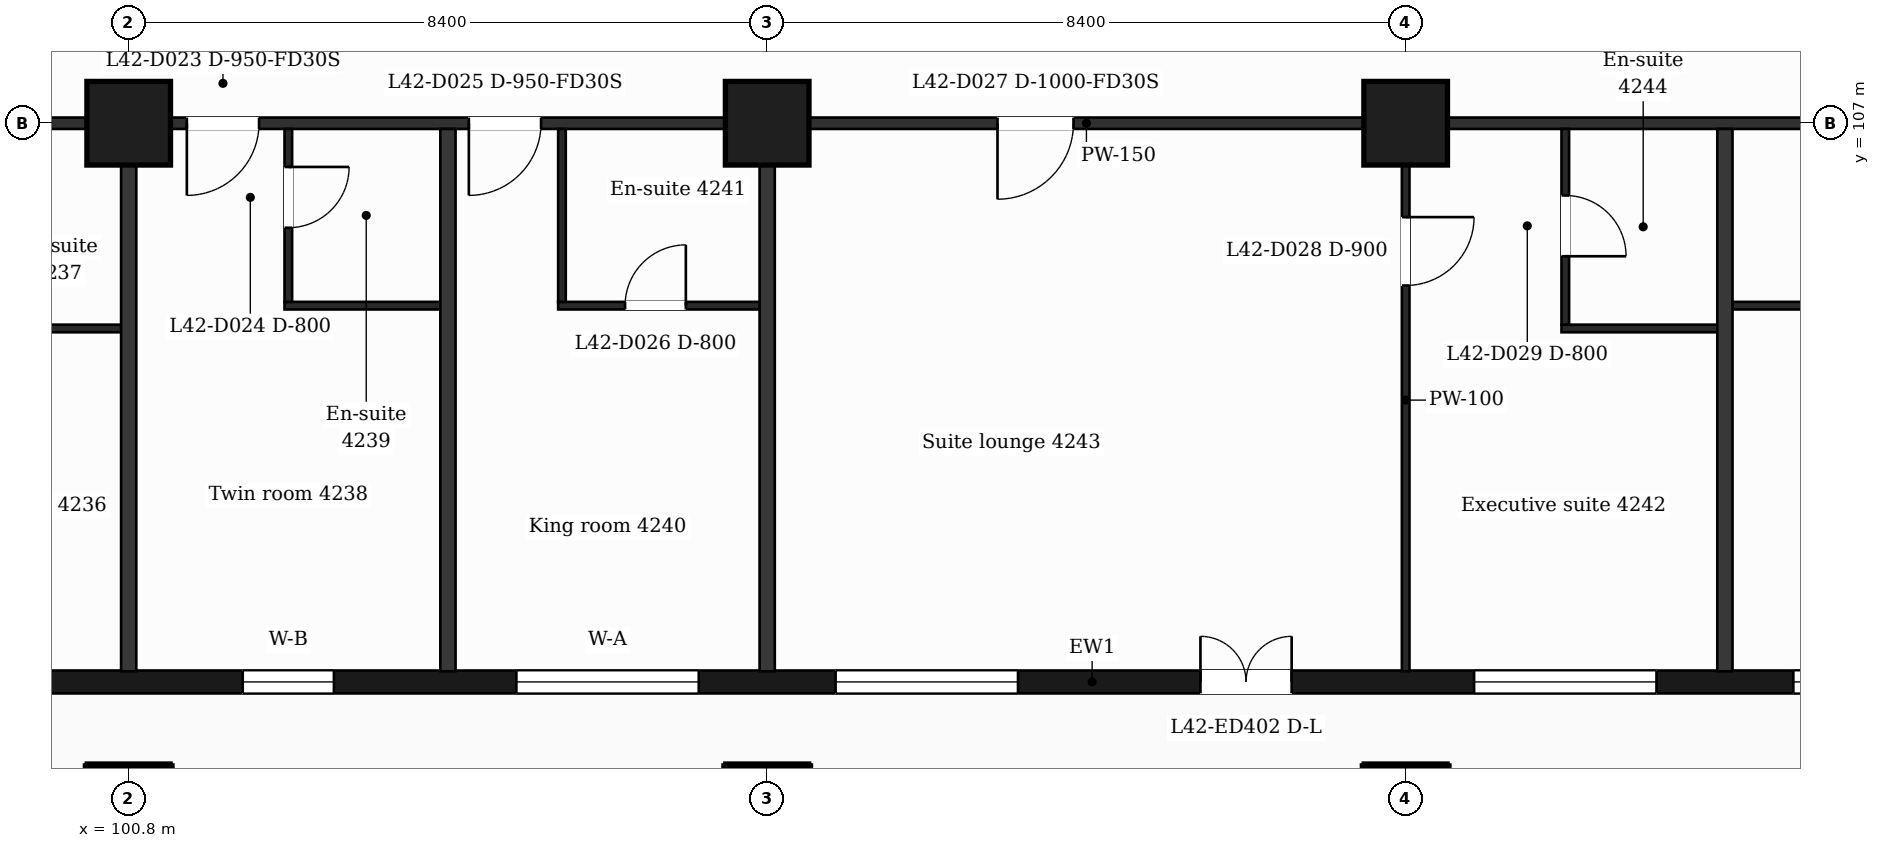
"""IFC4 building model, lengths in metres.
Left out: names, types, materials, properties, quantities, classifications, styles, units other than length and angle.
Written with IfcOpenShell. Run it as: python <this file> out.ifc"""

import sys

from ifc_helpers import new_model, si_unit, direction, frame, frame_2d, origin, origin_2d, place, context, subcontext, project, spatial, rectangle, extrude, element, fill, save


model = new_model("IFC4")
c1 = context("Model", 3, precision=1e-05, world=origin(), true_north=direction((0.0, 1.0)))
c2 = subcontext(c1, "Body", "Model", "MODEL_VIEW")
j1 = project(units=[si_unit("LENGTHUNIT", "METRE"), si_unit("PLANEANGLEUNIT", "RADIAN")], contexts=[c1])
p1 = place(None, origin())
s1 = spatial("IfcSite", under=j1, at=p1, CompositionType="ELEMENT")
p2 = place(p1, origin())
s2 = spatial("IfcBuilding", under=s1, at=p2, CompositionType="ELEMENT")
p3 = place(p2, frame((0.0, 0.0, 177.4)))
s3 = spatial("IfcBuildingStorey", under=s2, at=p3, CompositionType="ELEMENT", Elevation=177.4)
for number, where, z_axis, x_axis in (
    (1, (100.8, 98.0, 0.0), (0.0, 0.0, 1.0), (1.0, 0.0, 0.0)),
    (2, (109.2, 98.0, 0.0), (0.0, 0.0, 1.0), (1.0, 0.0, 0.0)),
    (3, (117.6, 98.0, 0.0), (0.0, 0.0, 1.0), (1.0, 0.0, 0.0)),
    (4, (100.8, 107.0, 0.0), (0.0, 0.0, 1.0), (1.0, 0.0, 0.0)),
    (5, (109.2, 107.0, 0.0), (0.0, 0.0, 1.0), (1.0, 0.0, 0.0)),
    (6, (117.6, 107.0, 0.0), (0.0, 0.0, 1.0), (1.0, 0.0, 0.0)),
):
    element("IfcColumn", number, at=place(p3, frame(where, z_axis=z_axis, x_axis=x_axis)), inside=s3, PredefinedType="COLUMN", context=c2, shape_type="SweptSolid", body=[
        extrude(rectangle(XDim=1.1, YDim=1.1, at=origin_2d()), origin(), (0.0, 0.0, 1.0), 3.7),
    ])
p4 = place(p3, frame((89.85, 99.65, 0.0), z_axis=(0.0, 0.0, 1.0), x_axis=(1.0, 0.0, 0.0)))
e7 = element("IfcWall", 7, at=p4, inside=s3, PredefinedType="SOLIDWALL", context=c2, shape_type="SweptSolid", body=[
    extrude(rectangle(XDim=47.25, YDim=0.3, at=frame_2d((23.625, 0.0))), origin(), (0.0, 0.0, 1.0), 3.38),
])
p5 = place(p4, frame((0.725, 0.0, 0.9)))
e8 = element("IfcOpeningElement", 8, at=p5, cuts=e7, PredefinedType="OPENING", context=c2, shape_type="SweptSolid", body=[
    extrude(rectangle(XDim=1.2, YDim=2.1, at=frame_2d((0.6, 1.05))), frame((0.0, 0.16, 0.0), z_axis=(0.0, -1.0, 0.0), x_axis=(1.0, 0.0, 0.0)), (0.0, 0.0, 1.0), 0.32),
])
p6 = place(p4, frame((3.45, 0.0, 0.9)))
e9 = element("IfcOpeningElement", 9, at=p6, cuts=e7, PredefinedType="OPENING", context=c2, shape_type="SweptSolid", body=[
    extrude(rectangle(XDim=2.4, YDim=2.1, at=frame_2d((1.2, 1.05))), frame((0.0, 0.16, 0.0), z_axis=(0.0, -1.0, 0.0), x_axis=(1.0, 0.0, 0.0)), (0.0, 0.0, 1.0), 0.32),
])
p7 = place(p4, frame((8.25, 0.0, 0.9)))
e10 = element("IfcOpeningElement", 10, at=p7, cuts=e7, PredefinedType="OPENING", context=c2, shape_type="SweptSolid", body=[
    extrude(rectangle(XDim=1.2, YDim=2.1, at=frame_2d((0.6, 1.05))), frame((0.0, 0.16, 0.0), z_axis=(0.0, -1.0, 0.0), x_axis=(1.0, 0.0, 0.0)), (0.0, 0.0, 1.0), 0.32),
])
p8 = place(p4, frame((12.45, 0.0, 0.9)))
e11 = element("IfcOpeningElement", 11, at=p8, cuts=e7, PredefinedType="OPENING", context=c2, shape_type="SweptSolid", body=[
    extrude(rectangle(XDim=1.2, YDim=2.1, at=frame_2d((0.6, 1.05))), frame((0.0, 0.16, 0.0), z_axis=(0.0, -1.0, 0.0), x_axis=(1.0, 0.0, 0.0)), (0.0, 0.0, 1.0), 0.32),
])
p9 = place(p4, frame((16.05, 0.0, 0.9)))
e12 = element("IfcOpeningElement", 12, at=p9, cuts=e7, PredefinedType="OPENING", context=c2, shape_type="SweptSolid", body=[
    extrude(rectangle(XDim=2.4, YDim=2.1, at=frame_2d((1.2, 1.05))), frame((0.0, 0.16, 0.0), z_axis=(0.0, -1.0, 0.0), x_axis=(1.0, 0.0, 0.0)), (0.0, 0.0, 1.0), 0.32),
])
p10 = place(p4, frame((20.25, 0.0, 0.9)))
e13 = element("IfcOpeningElement", 13, at=p10, cuts=e7, PredefinedType="OPENING", context=c2, shape_type="SweptSolid", body=[
    extrude(rectangle(XDim=2.4, YDim=2.1, at=frame_2d((1.2, 1.05))), frame((0.0, 0.16, 0.0), z_axis=(0.0, -1.0, 0.0), x_axis=(1.0, 0.0, 0.0)), (0.0, 0.0, 1.0), 0.32),
])
p11 = place(p4, frame((25.05, 0.0, 0.0)))
e14 = element("IfcOpeningElement", 14, at=p11, cuts=e7, PredefinedType="OPENING", context=c2, shape_type="SweptSolid", body=[
    extrude(rectangle(XDim=1.2, YDim=2.4, at=frame_2d((0.6, 1.2))), frame((0.0, 0.16, 0.0), z_axis=(0.0, -1.0, 0.0), x_axis=(1.0, 0.0, 0.0)), (0.0, 0.0, 1.0), 0.32),
])
p12 = place(p4, frame((28.65, 0.0, 0.9)))
e15 = element("IfcOpeningElement", 15, at=p12, cuts=e7, PredefinedType="OPENING", context=c2, shape_type="SweptSolid", body=[
    extrude(rectangle(XDim=2.4, YDim=2.1, at=frame_2d((1.2, 1.05))), frame((0.0, 0.16, 0.0), z_axis=(0.0, -1.0, 0.0), x_axis=(1.0, 0.0, 0.0)), (0.0, 0.0, 1.0), 0.32),
])
p13 = place(p4, frame((32.85, 0.0, 0.9)))
e16 = element("IfcOpeningElement", 16, at=p13, cuts=e7, PredefinedType="OPENING", context=c2, shape_type="SweptSolid", body=[
    extrude(rectangle(XDim=2.4, YDim=2.1, at=frame_2d((1.2, 1.05))), frame((0.0, 0.16, 0.0), z_axis=(0.0, -1.0, 0.0), x_axis=(1.0, 0.0, 0.0)), (0.0, 0.0, 1.0), 0.32),
])
p14 = place(p4, frame((37.65, 0.0, 0.9)))
e17 = element("IfcOpeningElement", 17, at=p14, cuts=e7, PredefinedType="OPENING", context=c2, shape_type="SweptSolid", body=[
    extrude(rectangle(XDim=1.2, YDim=2.1, at=frame_2d((0.6, 1.05))), frame((0.0, 0.16, 0.0), z_axis=(0.0, -1.0, 0.0), x_axis=(1.0, 0.0, 0.0)), (0.0, 0.0, 1.0), 0.32),
])
p15 = place(p4, frame((41.85, 0.0, 0.9)))
e18 = element("IfcOpeningElement", 18, at=p15, cuts=e7, PredefinedType="OPENING", context=c2, shape_type="SweptSolid", body=[
    extrude(rectangle(XDim=1.2, YDim=2.1, at=frame_2d((0.6, 1.05))), frame((0.0, 0.16, 0.0), z_axis=(0.0, -1.0, 0.0), x_axis=(1.0, 0.0, 0.0)), (0.0, 0.0, 1.0), 0.32),
])
p16 = place(p4, frame((45.25, 0.0, 0.9)))
e19 = element("IfcOpeningElement", 19, at=p16, cuts=e7, PredefinedType="OPENING", context=c2, shape_type="SweptSolid", body=[
    extrude(rectangle(XDim=1.2, YDim=2.1, at=frame_2d((0.6, 1.05))), frame((0.0, 0.16, 0.0), z_axis=(0.0, -1.0, 0.0), x_axis=(1.0, 0.0, 0.0)), (0.0, 0.0, 1.0), 0.32),
])
p17 = place(p3, frame((98.05, 104.3, 0.0), z_axis=(0.0, 0.0, 1.0), x_axis=(1.0, 0.0, 0.0)))
e20 = element("IfcWall", 20, at=p17, inside=s3, PredefinedType="PARTITIONING", context=c2, shape_type="SweptSolid", body=[
    extrude(rectangle(XDim=2.75, YDim=0.1, at=frame_2d((1.375, 0.0))), origin(), (0.0, 0.0, 1.0), 3.38),
])
p18 = place(p3, frame((119.65, 104.3, 0.0), z_axis=(0.0, 0.0, 1.0), x_axis=(1.0, 0.0, 0.0)))
e21 = element("IfcWall", 21, at=p18, inside=s3, PredefinedType="PARTITIONING", context=c2, shape_type="SweptSolid", body=[
    extrude(rectangle(XDim=2.15, YDim=0.1, at=frame_2d((1.075, 0.0))), origin(), (0.0, 0.0, 1.0), 3.38),
])
p19 = place(p3, frame((102.85, 104.6, 0.0), z_axis=(0.0, 0.0, 1.0), x_axis=(1.0, 0.0, 0.0)))
e22 = element("IfcWall", 22, at=p19, inside=s3, PredefinedType="PARTITIONING", context=c2, shape_type="SweptSolid", body=[
    extrude(rectangle(XDim=2.15, YDim=0.1, at=frame_2d((1.075, 0.0))), origin(), (0.0, 0.0, 1.0), 3.38),
])
p20 = place(p3, frame((106.45, 104.6, 0.0), z_axis=(0.0, 0.0, 1.0), x_axis=(1.0, 0.0, 0.0)))
e23 = element("IfcWall", 23, at=p20, inside=s3, PredefinedType="PARTITIONING", context=c2, shape_type="SweptSolid", body=[
    extrude(rectangle(XDim=2.75, YDim=0.1, at=frame_2d((1.375, 0.0))), origin(), (0.0, 0.0, 1.0), 3.38),
])
p21 = place(p20, frame((0.88, 0.0, 0.0)))
e24 = element("IfcOpeningElement", 24, at=p21, cuts=e23, PredefinedType="OPENING", context=c2, shape_type="SweptSolid", body=[
    extrude(rectangle(XDim=0.8, YDim=2.1, at=frame_2d((0.4, 1.05))), frame((0.0, 0.06, 0.0), z_axis=(0.0, -1.0, 0.0), x_axis=(1.0, 0.0, 0.0)), (0.0, 0.0, 1.0), 0.12),
])
p22 = place(p3, frame((121.8, 104.6, 0.0), z_axis=(0.0, 0.0, 1.0), x_axis=(1.0, 0.0, 0.0)))
e25 = element("IfcWall", 25, at=p22, inside=s3, PredefinedType="PARTITIONING", context=c2, shape_type="SweptSolid", body=[
    extrude(rectangle(XDim=2.15, YDim=0.1, at=frame_2d((1.075, 0.0))), origin(), (0.0, 0.0, 1.0), 3.38),
])
p23 = place(p3, frame((87.018, 107.0, 0.0), z_axis=(0.0, 0.0, 1.0), x_axis=(1.0, 0.0, 0.0)))
e26 = element("IfcWall", 26, at=p23, inside=s3, PredefinedType="PARTITIONING", context=c2, shape_type="SweptSolid", body=[
    extrude(rectangle(XDim=52.765, YDim=0.15, at=frame_2d((26.382, 0.0))), origin(), (0.0, 0.0, 1.0), 3.38),
])
p24 = place(p23, frame((1.276, 0.0, 0.0)))
e27 = element("IfcOpeningElement", 27, at=p24, cuts=e26, PredefinedType="OPENING", context=c2, shape_type="SweptSolid", body=[
    extrude(rectangle(XDim=0.95, YDim=2.1, at=frame_2d((0.475, 1.05))), frame((0.0, 0.085, 0.0), z_axis=(0.0, -1.0, 0.0), x_axis=(1.0, 0.0, 0.0)), (0.0, 0.0, 1.0), 0.17),
])
p25 = place(p23, frame((8.357, 0.0, 0.0)))
e28 = element("IfcOpeningElement", 28, at=p25, cuts=e26, PredefinedType="OPENING", context=c2, shape_type="SweptSolid", body=[
    extrude(rectangle(XDim=0.95, YDim=2.1, at=frame_2d((0.475, 1.05))), frame((0.0, 0.085, 0.0), z_axis=(0.0, -1.0, 0.0), x_axis=(1.0, 0.0, 0.0)), (0.0, 0.0, 1.0), 0.17),
])
p26 = place(p23, frame((9.832, 0.0, 0.0)))
e29 = element("IfcOpeningElement", 29, at=p26, cuts=e26, PredefinedType="OPENING", context=c2, shape_type="SweptSolid", body=[
    extrude(rectangle(XDim=1.0, YDim=2.1, at=frame_2d((0.5, 1.05))), frame((0.0, 0.085, 0.0), z_axis=(0.0, -1.0, 0.0), x_axis=(1.0, 0.0, 0.0)), (0.0, 0.0, 1.0), 0.17),
])
p27 = place(p23, frame((14.547, 0.0, 0.0)))
e30 = element("IfcOpeningElement", 30, at=p27, cuts=e26, PredefinedType="OPENING", context=c2, shape_type="SweptSolid", body=[
    extrude(rectangle(XDim=0.95, YDim=2.1, at=frame_2d((0.475, 1.05))), frame((0.0, 0.085, 0.0), z_axis=(0.0, -1.0, 0.0), x_axis=(1.0, 0.0, 0.0)), (0.0, 0.0, 1.0), 0.17),
])
p28 = place(p23, frame((18.257, 0.0, 0.0)))
e31 = element("IfcOpeningElement", 31, at=p28, cuts=e26, PredefinedType="OPENING", context=c2, shape_type="SweptSolid", body=[
    extrude(rectangle(XDim=0.95, YDim=2.1, at=frame_2d((0.475, 1.05))), frame((0.0, 0.085, 0.0), z_axis=(0.0, -1.0, 0.0), x_axis=(1.0, 0.0, 0.0)), (0.0, 0.0, 1.0), 0.17),
])
p29 = place(p23, frame((25.212, 0.0, 0.0)))
e32 = element("IfcOpeningElement", 32, at=p29, cuts=e26, PredefinedType="OPENING", context=c2, shape_type="SweptSolid", body=[
    extrude(rectangle(XDim=1.0, YDim=2.1, at=frame_2d((0.5, 1.05))), frame((0.0, 0.085, 0.0), z_axis=(0.0, -1.0, 0.0), x_axis=(1.0, 0.0, 0.0)), (0.0, 0.0, 1.0), 0.17),
])
p30 = place(p23, frame((37.267, 0.0, 0.0)))
e33 = element("IfcOpeningElement", 33, at=p30, cuts=e26, PredefinedType="OPENING", context=c2, shape_type="SweptSolid", body=[
    extrude(rectangle(XDim=0.95, YDim=2.1, at=frame_2d((0.475, 1.05))), frame((0.0, 0.085, 0.0), z_axis=(0.0, -1.0, 0.0), x_axis=(1.0, 0.0, 0.0)), (0.0, 0.0, 1.0), 0.17),
])
p31 = place(p23, frame((41.957, 0.0, 0.0)))
e34 = element("IfcOpeningElement", 34, at=p31, cuts=e26, PredefinedType="OPENING", context=c2, shape_type="SweptSolid", body=[
    extrude(rectangle(XDim=0.95, YDim=2.1, at=frame_2d((0.475, 1.05))), frame((0.0, 0.085, 0.0), z_axis=(0.0, -1.0, 0.0), x_axis=(1.0, 0.0, 0.0)), (0.0, 0.0, 1.0), 0.17),
])
p32 = place(p23, frame((45.632, 0.0, 0.0)))
e35 = element("IfcOpeningElement", 35, at=p32, cuts=e26, PredefinedType="OPENING", context=c2, shape_type="SweptSolid", body=[
    extrude(rectangle(XDim=0.95, YDim=2.1, at=frame_2d((0.475, 1.05))), frame((0.0, 0.085, 0.0), z_axis=(0.0, -1.0, 0.0), x_axis=(1.0, 0.0, 0.0)), (0.0, 0.0, 1.0), 0.17),
])
p33 = place(p23, frame((48.767, 0.0, 0.0)))
e36 = element("IfcOpeningElement", 36, at=p33, cuts=e26, PredefinedType="OPENING", context=c2, shape_type="SweptSolid", body=[
    extrude(rectangle(XDim=0.95, YDim=2.1, at=frame_2d((0.475, 1.05))), frame((0.0, 0.085, 0.0), z_axis=(0.0, -1.0, 0.0), x_axis=(1.0, 0.0, 0.0)), (0.0, 0.0, 1.0), 0.17),
])
p34 = place(p3, frame((100.8, 99.79, 0.0), z_axis=(0.0, 0.0, 1.0), x_axis=(0.0, 1.0, 0.0)))
e37 = element("IfcWall", 37, at=p34, inside=s3, PredefinedType="PARTITIONING", context=c2, shape_type="SweptSolid", body=[
    extrude(rectangle(XDim=7.135, YDim=0.2, at=frame_2d((3.567, 0.0))), origin(), (0.0, 0.0, 1.0), 3.38),
])
p35 = place(p3, frame((102.9, 104.65, 0.0), z_axis=(0.0, 0.0, 1.0), x_axis=(0.0, 1.0, 0.0)))
e38 = element("IfcWall", 38, at=p35, inside=s3, PredefinedType="PARTITIONING", context=c2, shape_type="SweptSolid", body=[
    extrude(rectangle(XDim=2.275, YDim=0.1, at=frame_2d((1.138, 0.0))), origin(), (0.0, 0.0, 1.0), 3.38),
])
p36 = place(p35, frame((0.975, 0.0, 0.0)))
e39 = element("IfcOpeningElement", 39, at=p36, cuts=e38, PredefinedType="OPENING", context=c2, shape_type="SweptSolid", body=[
    extrude(rectangle(XDim=0.8, YDim=2.1, at=frame_2d((0.4, 1.05))), frame((0.0, 0.06, 0.0), z_axis=(0.0, -1.0, 0.0), x_axis=(1.0, 0.0, 0.0)), (0.0, 0.0, 1.0), 0.12),
])
p37 = place(p3, frame((105.0, 99.79, 0.0), z_axis=(0.0, 0.0, 1.0), x_axis=(0.0, 1.0, 0.0)))
e40 = element("IfcWall", 40, at=p37, inside=s3, PredefinedType="PARTITIONING", context=c2, shape_type="SweptSolid", body=[
    extrude(rectangle(XDim=7.135, YDim=0.2, at=frame_2d((3.567, 0.0))), origin(), (0.0, 0.0, 1.0), 3.38),
])
p38 = place(p3, frame((106.5, 104.65, 0.0), z_axis=(0.0, 0.0, 1.0), x_axis=(0.0, 1.0, 0.0)))
e41 = element("IfcWall", 41, at=p38, inside=s3, PredefinedType="PARTITIONING", context=c2, shape_type="SweptSolid", body=[
    extrude(rectangle(XDim=2.275, YDim=0.1, at=frame_2d((1.138, 0.0))), origin(), (0.0, 0.0, 1.0), 3.38),
])
p39 = place(p3, frame((109.2, 99.79, 0.0), z_axis=(0.0, 0.0, 1.0), x_axis=(0.0, 1.0, 0.0)))
e42 = element("IfcWall", 42, at=p39, inside=s3, PredefinedType="PARTITIONING", context=c2, shape_type="SweptSolid", body=[
    extrude(rectangle(XDim=7.135, YDim=0.2, at=frame_2d((3.567, 0.0))), origin(), (0.0, 0.0, 1.0), 3.38),
])
p40 = place(p3, frame((117.6, 99.79, 0.0), z_axis=(0.0, 0.0, 1.0), x_axis=(0.0, 1.0, 0.0)))
e43 = element("IfcWall", 43, at=p40, inside=s3, PredefinedType="PARTITIONING", context=c2, shape_type="SweptSolid", body=[
    extrude(rectangle(XDim=7.135, YDim=0.1, at=frame_2d((3.567, 0.0))), origin(), (0.0, 0.0, 1.0), 3.38),
])
p41 = place(p40, frame((5.075, 0.0, 0.0)))
e44 = element("IfcOpeningElement", 44, at=p41, cuts=e43, PredefinedType="OPENING", context=c2, shape_type="SweptSolid", body=[
    extrude(rectangle(XDim=0.9, YDim=2.1, at=frame_2d((0.45, 1.05))), frame((0.0, 0.06, 0.0), z_axis=(0.0, -1.0, 0.0), x_axis=(1.0, 0.0, 0.0)), (0.0, 0.0, 1.0), 0.12),
])
p42 = place(p3, frame((119.7, 104.35, 0.0), z_axis=(0.0, 0.0, 1.0), x_axis=(0.0, 1.0, 0.0)))
e45 = element("IfcWall", 45, at=p42, inside=s3, PredefinedType="PARTITIONING", context=c2, shape_type="SweptSolid", body=[
    extrude(rectangle(XDim=2.575, YDim=0.1, at=frame_2d((1.288, 0.0))), origin(), (0.0, 0.0, 1.0), 3.38),
])
p43 = place(p42, frame((0.9, 0.0, 0.0)))
e46 = element("IfcOpeningElement", 46, at=p43, cuts=e45, PredefinedType="OPENING", context=c2, shape_type="SweptSolid", body=[
    extrude(rectangle(XDim=0.8, YDim=2.1, at=frame_2d((0.4, 1.05))), frame((0.0, 0.06, 0.0), z_axis=(0.0, -1.0, 0.0), x_axis=(1.0, 0.0, 0.0)), (0.0, 0.0, 1.0), 0.12),
])
p44 = place(p3, frame((121.8, 99.79, 0.0), z_axis=(0.0, 0.0, 1.0), x_axis=(0.0, 1.0, 0.0)))
e47 = element("IfcWall", 47, at=p44, inside=s3, PredefinedType="PARTITIONING", context=c2, shape_type="SweptSolid", body=[
    extrude(rectangle(XDim=7.135, YDim=0.2, at=frame_2d((3.567, 0.0))), origin(), (0.0, 0.0, 1.0), 3.38),
])
p45 = place(p8, origin())
e48 = element("IfcWindow", 48, at=p45, inside=s3, PartitioningType="SINGLE_PANEL", PredefinedType="WINDOW", context=c2, shape_type="SweptSolid", body=[
    extrude(rectangle(XDim=1.2, YDim=2.1, at=frame_2d((0.6, 1.05))), frame((0.0, 0.03, 0.0), z_axis=(0.0, -1.0, 0.0), x_axis=(1.0, 0.0, 0.0)), (0.0, 0.0, 1.0), 0.06),
])
fill(e11, e48)
p46 = place(p9, origin())
e49 = element("IfcWindow", 49, at=p46, inside=s3, PartitioningType="SINGLE_PANEL", PredefinedType="WINDOW", context=c2, shape_type="SweptSolid", body=[
    extrude(rectangle(XDim=2.4, YDim=2.1, at=frame_2d((1.2, 1.05))), frame((0.0, 0.03, 0.0), z_axis=(0.0, -1.0, 0.0), x_axis=(1.0, 0.0, 0.0)), (0.0, 0.0, 1.0), 0.06),
])
fill(e12, e49)
p47 = place(p10, origin())
e50 = element("IfcWindow", 50, at=p47, inside=s3, PartitioningType="SINGLE_PANEL", PredefinedType="WINDOW", context=c2, shape_type="SweptSolid", body=[
    extrude(rectangle(XDim=2.4, YDim=2.1, at=frame_2d((1.2, 1.05))), frame((0.0, 0.03, 0.0), z_axis=(0.0, -1.0, 0.0), x_axis=(1.0, 0.0, 0.0)), (0.0, 0.0, 1.0), 0.06),
])
fill(e13, e50)
p48 = place(p11, origin())
e51 = element("IfcDoor", 51, at=p48, inside=s3, OperationType="DOUBLE_DOOR_SINGLE_SWING", PredefinedType="DOOR", context=c2, shape_type="SweptSolid", body=[
    extrude(rectangle(XDim=1.2, YDim=2.4, at=frame_2d((0.6, 1.2))), frame((0.0, 0.025, 0.0), z_axis=(0.0, -1.0, 0.0), x_axis=(1.0, 0.0, 0.0)), (0.0, 0.0, 1.0), 0.05),
])
fill(e14, e51)
p49 = place(p12, origin())
e52 = element("IfcWindow", 52, at=p49, inside=s3, PartitioningType="SINGLE_PANEL", PredefinedType="WINDOW", context=c2, shape_type="SweptSolid", body=[
    extrude(rectangle(XDim=2.4, YDim=2.1, at=frame_2d((1.2, 1.05))), frame((0.0, 0.03, 0.0), z_axis=(0.0, -1.0, 0.0), x_axis=(1.0, 0.0, 0.0)), (0.0, 0.0, 1.0), 0.06),
])
fill(e15, e52)
p50 = place(p13, origin())
e53 = element("IfcWindow", 53, at=p50, inside=s3, PartitioningType="SINGLE_PANEL", PredefinedType="WINDOW", context=c2, shape_type="SweptSolid", body=[
    extrude(rectangle(XDim=2.4, YDim=2.1, at=frame_2d((1.2, 1.05))), frame((0.0, 0.03, 0.0), z_axis=(0.0, -1.0, 0.0), x_axis=(1.0, 0.0, 0.0)), (0.0, 0.0, 1.0), 0.06),
])
fill(e16, e53)
p51 = place(p27, origin())
e54 = element("IfcDoor", 54, at=p51, inside=s3, OperationType="SINGLE_SWING_LEFT", PredefinedType="DOOR", context=c2, shape_type="SweptSolid", body=[
    extrude(rectangle(XDim=0.95, YDim=2.1, at=frame_2d((0.475, 1.05))), frame((0.0, 0.025, 0.0), z_axis=(0.0, -1.0, 0.0), x_axis=(1.0, 0.0, 0.0)), (0.0, 0.0, 1.0), 0.05),
])
fill(e30, e54)
p52 = place(p36, origin())
e55 = element("IfcDoor", 55, at=p52, inside=s3, OperationType="SINGLE_SWING_RIGHT", PredefinedType="DOOR", context=c2, shape_type="SweptSolid", body=[
    extrude(rectangle(XDim=0.8, YDim=2.1, at=frame_2d((0.4, 1.05))), frame((0.0, 0.025, 0.0), z_axis=(0.0, -1.0, 0.0), x_axis=(1.0, 0.0, 0.0)), (0.0, 0.0, 1.0), 0.05),
])
fill(e39, e55)
p53 = place(p28, origin())
e56 = element("IfcDoor", 56, at=p53, inside=s3, OperationType="SINGLE_SWING_LEFT", PredefinedType="DOOR", context=c2, shape_type="SweptSolid", body=[
    extrude(rectangle(XDim=0.95, YDim=2.1, at=frame_2d((0.475, 1.05))), frame((0.0, 0.025, 0.0), z_axis=(0.0, -1.0, 0.0), x_axis=(1.0, 0.0, 0.0)), (0.0, 0.0, 1.0), 0.05),
])
fill(e31, e56)
p54 = place(p21, origin())
e57 = element("IfcDoor", 57, at=p54, inside=s3, OperationType="SINGLE_SWING_RIGHT", PredefinedType="DOOR", context=c2, shape_type="SweptSolid", body=[
    extrude(rectangle(XDim=0.8, YDim=2.1, at=frame_2d((0.4, 1.05))), frame((0.0, 0.025, 0.0), z_axis=(0.0, -1.0, 0.0), x_axis=(1.0, 0.0, 0.0)), (0.0, 0.0, 1.0), 0.05),
])
fill(e24, e57)
p55 = place(p29, origin())
e58 = element("IfcDoor", 58, at=p55, inside=s3, OperationType="SINGLE_SWING_LEFT", PredefinedType="DOOR", context=c2, shape_type="SweptSolid", body=[
    extrude(rectangle(XDim=1.0, YDim=2.1, at=frame_2d((0.5, 1.05))), frame((0.0, 0.025, 0.0), z_axis=(0.0, -1.0, 0.0), x_axis=(1.0, 0.0, 0.0)), (0.0, 0.0, 1.0), 0.05),
])
fill(e32, e58)
p56 = place(p41, origin())
e59 = element("IfcDoor", 59, at=p56, inside=s3, OperationType="SINGLE_SWING_RIGHT", PredefinedType="DOOR", context=c2, shape_type="SweptSolid", body=[
    extrude(rectangle(XDim=0.9, YDim=2.1, at=frame_2d((0.45, 1.05))), frame((0.0, 0.025, 0.0), z_axis=(0.0, -1.0, 0.0), x_axis=(1.0, 0.0, 0.0)), (0.0, 0.0, 1.0), 0.05),
])
fill(e44, e59)
p57 = place(p43, origin())
e60 = element("IfcDoor", 60, at=p57, inside=s3, OperationType="SINGLE_SWING_LEFT", PredefinedType="DOOR", context=c2, shape_type="SweptSolid", body=[
    extrude(rectangle(XDim=0.8, YDim=2.1, at=frame_2d((0.4, 1.05))), frame((0.0, 0.025, 0.0), z_axis=(0.0, -1.0, 0.0), x_axis=(1.0, 0.0, 0.0)), (0.0, 0.0, 1.0), 0.05),
])
fill(e46, e60)
save(model, sys.argv[1])
